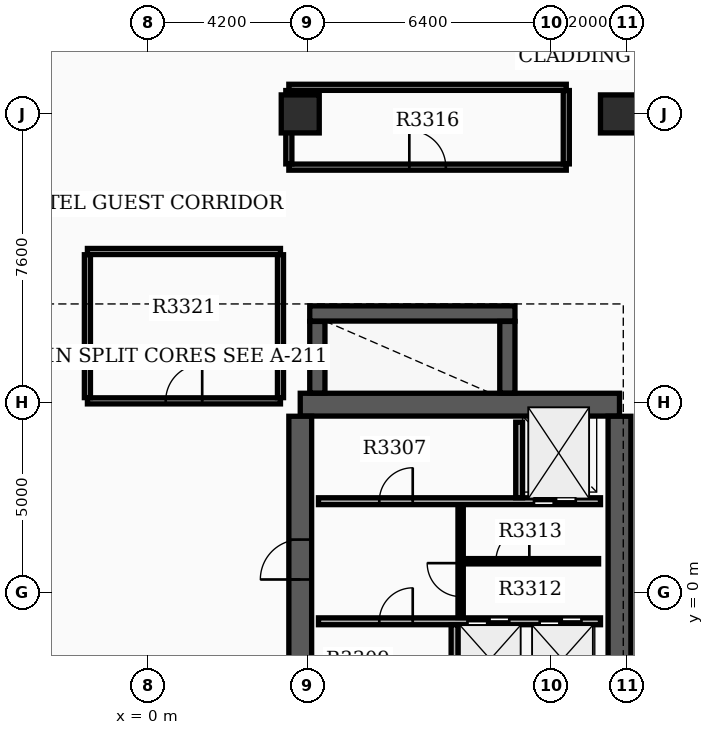
"""IFC4 building model, lengths in metres.
Left out: names, types, materials, properties, quantities, classifications, styles, units other than length and angle.
Written with IfcOpenShell. Run it as: python <this file> out.ifc"""

import sys

from ifc_helpers import new_model, si_unit, direction, frame, frame_2d, origin, origin_2d, place, context, subcontext, project, spatial, rectangle, extrude, element, fill, save


model = new_model("IFC4")
c1 = context("Model", 3, precision=1e-05, world=origin(), true_north=direction((0.0, 1.0)))
c2 = subcontext(c1, "Body", "Model", "MODEL_VIEW")
j1 = project(units=[si_unit("LENGTHUNIT", "METRE"), si_unit("PLANEANGLEUNIT", "RADIAN")], contexts=[c1])
p1 = place(None, origin())
s1 = spatial("IfcSite", under=j1, at=p1, CompositionType="ELEMENT")
p2 = place(p1, origin())
s2 = spatial("IfcBuilding", under=s1, at=p2, CompositionType="ELEMENT")
p3 = place(p2, frame((0.0, 0.0, 209.1)))
s3 = spatial("IfcBuildingStorey", under=s2, at=p3, CompositionType="ELEMENT", Elevation=209.1)
p4 = place(p3, frame((4.0, 4.95, 0.0), z_axis=(0.0, 0.0, 1.0), x_axis=(1.0, 0.0, 0.0)))
e1 = element("IfcWall", 1, at=p4, inside=s3, PredefinedType="SHEAR", context=c2, shape_type="SweptSolid", body=[
    extrude(rectangle(XDim=8.4, YDim=0.6, at=frame_2d((4.2, 0.0))), origin(), (0.0, 0.0, 1.0), 3.7),
])
p5 = place(p3, frame((4.0, -6.545, 0.0), z_axis=(0.0, 0.0, 1.0), x_axis=(0.0, 1.0, 0.0)))
e2 = element("IfcWall", 2, at=p5, inside=s3, PredefinedType="SHEAR", context=c2, shape_type="SweptSolid", body=[
    extrude(rectangle(XDim=11.19, YDim=0.6, at=frame_2d((5.595, 0.0))), origin(), (0.0, 0.0, 1.0), 3.7),
])
p6 = place(p5, frame((1.295, 0.0, 0.0)))
e3 = element("IfcOpeningElement", 3, at=p6, cuts=e2, PredefinedType="OPENING", context=c2, shape_type="SweptSolid", body=[
    extrude(rectangle(XDim=1.05, YDim=2.15, at=frame_2d((0.525, 1.075))), frame((0.0, 0.31, 0.0), z_axis=(0.0, -1.0, 0.0), x_axis=(1.0, 0.0, 0.0)), (0.0, 0.0, 1.0), 0.62),
])
p7 = place(p5, frame((6.895, 0.0, 0.0)))
e4 = element("IfcOpeningElement", 4, at=p7, cuts=e2, PredefinedType="OPENING", context=c2, shape_type="SweptSolid", body=[
    extrude(rectangle(XDim=1.05, YDim=2.15, at=frame_2d((0.525, 1.075))), frame((0.0, 0.31, 0.0), z_axis=(0.0, -1.0, 0.0), x_axis=(1.0, 0.0, 0.0)), (0.0, 0.0, 1.0), 0.62),
])
p8 = place(p3, frame((12.4, -6.545, 0.0), z_axis=(0.0, 0.0, 1.0), x_axis=(0.0, 1.0, 0.0)))
e5 = element("IfcWall", 5, at=p8, inside=s3, PredefinedType="SHEAR", context=c2, shape_type="SweptSolid", body=[
    extrude(rectangle(XDim=11.19, YDim=0.6, at=frame_2d((5.595, 0.0))), origin(), (0.0, 0.0, 1.0), 3.7),
])
p9 = place(p3, frame((4.45, 5.255, 0.0), z_axis=(0.0, 0.0, 1.0), x_axis=(0.0, 1.0, 0.0)))
e6 = element("IfcWall", 6, at=p9, inside=s3, PredefinedType="SHEAR", context=c2, shape_type="SweptSolid", body=[
    extrude(rectangle(XDim=1.885, YDim=0.4, at=frame_2d((0.942, 0.0))), origin(), (0.0, 0.0, 1.0), 3.7),
])
p10 = place(p3, frame((4.25, 7.35, 0.0), z_axis=(0.0, 0.0, 1.0), x_axis=(1.0, 0.0, 0.0)))
e7 = element("IfcWall", 7, at=p10, inside=s3, PredefinedType="SHEAR", context=c2, shape_type="SweptSolid", body=[
    extrude(rectangle(XDim=5.4, YDim=0.4, at=frame_2d((2.7, 0.0))), origin(), (0.0, 0.0, 1.0), 3.7),
])
p11 = place(p3, frame((9.45, 5.255, 0.0), z_axis=(0.0, 0.0, 1.0), x_axis=(0.0, 1.0, 0.0)))
e8 = element("IfcWall", 8, at=p11, inside=s3, PredefinedType="SHEAR", context=c2, shape_type="SweptSolid", body=[
    extrude(rectangle(XDim=1.885, YDim=0.4, at=frame_2d((0.942, 0.0))), origin(), (0.0, 0.0, 1.0), 3.7),
])
for number, where, z_axis, x_axis in (
    (9, (12.4, 12.6, 0.0), (0.0, 0.0, 1.0), (1.0, 0.0, 0.0)),
    (10, (4.0, 12.6, 0.0), (0.0, 0.0, 1.0), (1.0, 0.0, 0.0)),
):
    element("IfcColumn", number, at=place(p3, frame(where, z_axis=z_axis, x_axis=x_axis)), inside=s3, PredefinedType="COLUMN", context=c2, shape_type="SweptSolid", body=[
        extrude(rectangle(XDim=1.0, YDim=1.0, at=origin_2d()), origin(), (0.0, 0.0, 1.0), 3.9),
    ])
p12 = place(p3, frame((13.796, 14.194, 0.0), z_axis=(0.0, 0.0, 1.0), x_axis=(-0.998023660242, -0.06283926796, 0.0)))
e11 = element("IfcWall", 11, at=p12, inside=s3, PredefinedType="STANDARD", context=c2, shape_type="SweptSolid", body=[
    extrude(rectangle(XDim=1.22, YDim=0.28, at=frame_2d((0.61, 0.0))), origin(), (0.0, 0.0, 1.0), 3.18),
])
p13 = place(p3, frame((4.48, 2.41, 0.0), z_axis=(0.0, 0.0, 1.0), x_axis=(1.0, 0.0, 0.0)))
e12 = element("IfcWall", 12, at=p13, inside=s3, PredefinedType="SOLIDWALL", context=c2, shape_type="SweptSolid", body=[
    extrude(rectangle(XDim=7.42, YDim=0.18, at=frame_2d((3.71, 0.0))), origin(), (0.0, 0.0, 1.0), 3.17),
])
p14 = place(p13, frame((5.67, 0.0, 0.0)))
e13 = element("IfcOpeningElement", 13, at=p14, cuts=e12, PredefinedType="OPENING", context=c2, shape_type="SweptSolid", body=[
    extrude(rectangle(XDim=1.1, YDim=2.15, at=frame_2d((0.55, 1.075))), frame((0.0, 0.1, 0.0), z_axis=(0.0, -1.0, 0.0), x_axis=(1.0, 0.0, 0.0)), (0.0, 0.0, 1.0), 0.2),
])
p15 = place(p13, frame((1.6, 0.0, 0.0)))
e14 = element("IfcOpeningElement", 14, at=p15, cuts=e12, PredefinedType="OPENING", context=c2, shape_type="SweptSolid", body=[
    extrude(rectangle(XDim=0.88, YDim=2.1, at=frame_2d((0.44, 1.05))), frame((0.0, 0.1, 0.0), z_axis=(0.0, -1.0, 0.0), x_axis=(1.0, 0.0, 0.0)), (0.0, 0.0, 1.0), 0.2),
])
p16 = place(p3, frame((4.48, -0.75, 0.0), z_axis=(0.0, 0.0, 1.0), x_axis=(1.0, 0.0, 0.0)))
e15 = element("IfcWall", 15, at=p16, inside=s3, PredefinedType="SOLIDWALL", context=c2, shape_type="SweptSolid", body=[
    extrude(rectangle(XDim=7.42, YDim=0.18, at=frame_2d((3.71, 0.0))), origin(), (0.0, 0.0, 1.0), 3.17),
])
p17 = place(p16, frame((3.92, 0.0, 0.0)))
e16 = element("IfcOpeningElement", 16, at=p17, cuts=e15, PredefinedType="OPENING", context=c2, shape_type="SweptSolid", body=[
    extrude(rectangle(XDim=1.1, YDim=2.15, at=frame_2d((0.55, 1.075))), frame((0.0, 0.1, 0.0), z_axis=(0.0, -1.0, 0.0), x_axis=(1.0, 0.0, 0.0)), (0.0, 0.0, 1.0), 0.2),
])
p18 = place(p16, frame((5.82, 0.0, 0.0)))
e17 = element("IfcOpeningElement", 17, at=p18, cuts=e15, PredefinedType="OPENING", context=c2, shape_type="SweptSolid", body=[
    extrude(rectangle(XDim=1.1, YDim=2.15, at=frame_2d((0.55, 1.075))), frame((0.0, 0.1, 0.0), z_axis=(0.0, -1.0, 0.0), x_axis=(1.0, 0.0, 0.0)), (0.0, 0.0, 1.0), 0.2),
])
p19 = place(p16, frame((1.6, 0.0, 0.0)))
e18 = element("IfcOpeningElement", 18, at=p19, cuts=e15, PredefinedType="OPENING", context=c2, shape_type="SweptSolid", body=[
    extrude(rectangle(XDim=0.88, YDim=2.1, at=frame_2d((0.44, 1.05))), frame((0.0, 0.1, 0.0), z_axis=(0.0, -1.0, 0.0), x_axis=(1.0, 0.0, 0.0)), (0.0, 0.0, 1.0), 0.2),
])
p20 = place(p3, frame((9.76, 2.5, 0.0), z_axis=(0.0, 0.0, 1.0), x_axis=(0.0, 1.0, 0.0)))
e19 = element("IfcWall", 19, at=p20, inside=s3, PredefinedType="SOLIDWALL", context=c2, shape_type="SweptSolid", body=[
    extrude(rectangle(XDim=1.99, YDim=0.18, at=frame_2d((0.995, 0.0))), origin(), (0.0, 0.0, 1.0), 3.17),
])
p21 = place(p3, frame((8.06, -2.73, 0.0), z_axis=(0.0, 0.0, 1.0), x_axis=(0.0, 1.0, 0.0)))
e20 = element("IfcWall", 20, at=p21, inside=s3, PredefinedType="SOLIDWALL", context=c2, shape_type="SweptSolid", body=[
    extrude(rectangle(XDim=1.89, YDim=0.18, at=frame_2d((0.945, 0.0))), origin(), (0.0, 0.0, 1.0), 3.17),
])
p22 = place(p3, frame((8.22, -0.65, 0.0), z_axis=(0.0, 0.0, 1.0), x_axis=(0.0, 1.0, 0.0)))
e21 = element("IfcWall", 21, at=p22, inside=s3, PredefinedType="SOLIDWALL", context=c2, shape_type="SweptSolid", body=[
    extrude(rectangle(XDim=2.96, YDim=0.14, at=frame_2d((1.48, 0.0))), origin(), (0.0, 0.0, 1.0), 3.17),
])
p23 = place(p22, frame((0.55, 0.0, 0.0)))
e22 = element("IfcOpeningElement", 22, at=p23, cuts=e21, PredefinedType="OPENING", context=c2, shape_type="SweptSolid", body=[
    extrude(rectangle(XDim=0.88, YDim=2.1, at=frame_2d((0.44, 1.05))), frame((0.0, 0.08, 0.0), z_axis=(0.0, -1.0, 0.0), x_axis=(1.0, 0.0, 0.0)), (0.0, 0.0, 1.0), 0.16),
])
p24 = place(p3, frame((8.298, 0.83, 0.0), z_axis=(0.0, 0.0, 1.0), x_axis=(1.0, 0.0, 0.0)))
e23 = element("IfcWall", 23, at=p24, inside=s3, PredefinedType="PARTITIONING", context=c2, shape_type="SweptSolid", body=[
    extrude(rectangle(XDim=3.552, YDim=0.14, at=frame_2d((1.776, 0.0))), origin(), (0.0, 0.0, 1.0), 3.17),
])
p25 = place(p24, frame((0.85, 0.0, 0.0)))
e24 = element("IfcOpeningElement", 24, at=p25, cuts=e23, PredefinedType="OPENING", context=c2, shape_type="SweptSolid", body=[
    extrude(rectangle(XDim=0.88, YDim=2.1, at=frame_2d((0.44, 1.05))), frame((0.0, 0.08, 0.0), z_axis=(0.0, -1.0, 0.0), x_axis=(1.0, 0.0, 0.0)), (0.0, 0.0, 1.0), 0.16),
])
p26 = place(p3, frame((3.7, 11.2, 0.0), z_axis=(0.0, 0.0, 1.0), x_axis=(1.0, 0.0, 0.0)))
e25 = element("IfcWall", 25, at=p26, inside=s3, PredefinedType="PARTITIONING", context=c2, shape_type="SweptSolid", body=[
    extrude(rectangle(XDim=7.3, YDim=0.16, at=frame_2d((3.65, 0.0))), origin(), (0.0, 0.0, 1.0), 3.17),
])
p27 = place(p26, frame((3.17, 0.0, 0.0)))
e26 = element("IfcOpeningElement", 26, at=p27, cuts=e25, PredefinedType="OPENING", context=c2, shape_type="SweptSolid", body=[
    extrude(rectangle(XDim=0.96, YDim=2.15, at=frame_2d((0.48, 1.075))), frame((0.0, 0.09, 0.0), z_axis=(0.0, -1.0, 0.0), x_axis=(1.0, 0.0, 0.0)), (0.0, 0.0, 1.0), 0.18),
])
p28 = place(p3, frame((3.7, 13.3, 0.0), z_axis=(0.0, 0.0, 1.0), x_axis=(1.0, 0.0, 0.0)))
e27 = element("IfcWall", 27, at=p28, inside=s3, PredefinedType="PARTITIONING", context=c2, shape_type="SweptSolid", body=[
    extrude(rectangle(XDim=7.3, YDim=0.16, at=frame_2d((3.65, 0.0))), origin(), (0.0, 0.0, 1.0), 3.17),
])
for number, where, z_axis, x_axis in (
    (28, (3.7, 11.285, 0.0), (0.0, 0.0, 1.0), (0.0, 1.0, 0.0)),
    (29, (11.0, 11.285, 0.0), (0.0, 0.0, 1.0), (0.0, 1.0, 0.0)),
):
    element("IfcWall", number, at=place(p3, frame(where, z_axis=z_axis, x_axis=x_axis)), inside=s3, PredefinedType="PARTITIONING", context=c2, shape_type="SweptSolid", body=[
        extrude(rectangle(XDim=1.93, YDim=0.16, at=frame_2d((0.965, 0.0))), origin(), (0.0, 0.0, 1.0), 3.17),
    ])
p29 = place(p3, frame((-1.6, 5.05, 0.0), z_axis=(0.0, 0.0, 1.0), x_axis=(1.0, 0.0, 0.0)))
e30 = element("IfcWall", 30, at=p29, inside=s3, PredefinedType="PARTITIONING", context=c2, shape_type="SweptSolid", body=[
    extrude(rectangle(XDim=5.08, YDim=0.16, at=frame_2d((2.54, 0.0))), origin(), (0.0, 0.0, 1.0), 3.17),
])
p30 = place(p29, frame((2.06, 0.0, 0.0)))
e31 = element("IfcOpeningElement", 31, at=p30, cuts=e30, PredefinedType="OPENING", context=c2, shape_type="SweptSolid", body=[
    extrude(rectangle(XDim=0.96, YDim=2.15, at=frame_2d((0.48, 1.075))), frame((0.0, 0.09, 0.0), z_axis=(0.0, -1.0, 0.0), x_axis=(1.0, 0.0, 0.0)), (0.0, 0.0, 1.0), 0.18),
])
p31 = place(p3, frame((-1.6, 8.98, 0.0), z_axis=(0.0, 0.0, 1.0), x_axis=(1.0, 0.0, 0.0)))
e32 = element("IfcWall", 32, at=p31, inside=s3, PredefinedType="PARTITIONING", context=c2, shape_type="SweptSolid", body=[
    extrude(rectangle(XDim=5.08, YDim=0.16, at=frame_2d((2.54, 0.0))), origin(), (0.0, 0.0, 1.0), 3.17),
])
for number, where, z_axis, x_axis in (
    (33, (-1.6, 5.135, 0.0), (0.0, 0.0, 1.0), (0.0, 1.0, 0.0)),
    (34, (3.48, 5.135, 0.0), (0.0, 0.0, 1.0), (0.0, 1.0, 0.0)),
):
    element("IfcWall", number, at=place(p3, frame(where, z_axis=z_axis, x_axis=x_axis)), inside=s3, PredefinedType="PARTITIONING", context=c2, shape_type="SweptSolid", body=[
        extrude(rectangle(XDim=3.76, YDim=0.16, at=frame_2d((1.88, 0.0))), origin(), (0.0, 0.0, 1.0), 3.17),
    ])
p32 = place(p7, origin())
e35 = element("IfcDoor", 35, at=p32, inside=s3, OperationType="SINGLE_SWING_LEFT", PredefinedType="DOOR", context=c2, shape_type="SweptSolid", body=[
    extrude(rectangle(XDim=1.05, YDim=2.15, at=frame_2d((0.525, 1.075))), frame((0.0, 0.025, 0.0), z_axis=(0.0, -1.0, 0.0), x_axis=(1.0, 0.0, 0.0)), (0.0, 0.0, 1.0), 0.05),
])
fill(e4, e35)
p33 = place(p14, origin())
e36 = element("IfcDoor", 36, at=p33, inside=s3, OperationType="DOUBLE_DOOR_SLIDING", PredefinedType="DOOR", context=c2, shape_type="SweptSolid", body=[
    extrude(rectangle(XDim=1.1, YDim=2.15, at=frame_2d((0.55, 1.075))), frame((0.0, 0.025, 0.0), z_axis=(0.0, -1.0, 0.0), x_axis=(1.0, 0.0, 0.0)), (0.0, 0.0, 1.0), 0.05),
])
fill(e13, e36)
p34 = place(p17, origin())
e37 = element("IfcDoor", 37, at=p34, inside=s3, OperationType="DOUBLE_DOOR_SLIDING", PredefinedType="DOOR", context=c2, shape_type="SweptSolid", body=[
    extrude(rectangle(XDim=1.1, YDim=2.15, at=frame_2d((0.55, 1.075))), frame((0.0, 0.025, 0.0), z_axis=(0.0, -1.0, 0.0), x_axis=(1.0, 0.0, 0.0)), (0.0, 0.0, 1.0), 0.05),
])
fill(e16, e37)
p35 = place(p18, origin())
e38 = element("IfcDoor", 38, at=p35, inside=s3, OperationType="DOUBLE_DOOR_SLIDING", PredefinedType="DOOR", context=c2, shape_type="SweptSolid", body=[
    extrude(rectangle(XDim=1.1, YDim=2.15, at=frame_2d((0.55, 1.075))), frame((0.0, 0.025, 0.0), z_axis=(0.0, -1.0, 0.0), x_axis=(1.0, 0.0, 0.0)), (0.0, 0.0, 1.0), 0.05),
])
fill(e17, e38)
p36 = place(p15, origin())
e39 = element("IfcDoor", 39, at=p36, inside=s3, OperationType="SINGLE_SWING_RIGHT", PredefinedType="DOOR", context=c2, shape_type="SweptSolid", body=[
    extrude(rectangle(XDim=0.88, YDim=2.1, at=frame_2d((0.44, 1.05))), frame((0.0, 0.025, 0.0), z_axis=(0.0, -1.0, 0.0), x_axis=(1.0, 0.0, 0.0)), (0.0, 0.0, 1.0), 0.05),
])
fill(e14, e39)
p37 = place(p19, origin())
e40 = element("IfcDoor", 40, at=p37, inside=s3, OperationType="SINGLE_SWING_RIGHT", PredefinedType="DOOR", context=c2, shape_type="SweptSolid", body=[
    extrude(rectangle(XDim=0.88, YDim=2.1, at=frame_2d((0.44, 1.05))), frame((0.0, 0.025, 0.0), z_axis=(0.0, -1.0, 0.0), x_axis=(1.0, 0.0, 0.0)), (0.0, 0.0, 1.0), 0.05),
])
fill(e18, e40)
p38 = place(p23, origin())
e41 = element("IfcDoor", 41, at=p38, inside=s3, OperationType="SINGLE_SWING_RIGHT", PredefinedType="DOOR", context=c2, shape_type="SweptSolid", body=[
    extrude(rectangle(XDim=0.88, YDim=2.1, at=frame_2d((0.44, 1.05))), frame((0.0, 0.025, 0.0), z_axis=(0.0, -1.0, 0.0), x_axis=(1.0, 0.0, 0.0)), (0.0, 0.0, 1.0), 0.05),
])
fill(e22, e41)
p39 = place(p25, origin())
e42 = element("IfcDoor", 42, at=p39, inside=s3, OperationType="SINGLE_SWING_RIGHT", PredefinedType="DOOR", context=c2, shape_type="SweptSolid", body=[
    extrude(rectangle(XDim=0.88, YDim=2.1, at=frame_2d((0.44, 1.05))), frame((0.0, 0.025, 0.0), z_axis=(0.0, -1.0, 0.0), x_axis=(1.0, 0.0, 0.0)), (0.0, 0.0, 1.0), 0.05),
])
fill(e24, e42)
p40 = place(p27, origin())
e43 = element("IfcDoor", 43, at=p40, inside=s3, OperationType="SINGLE_SWING_LEFT", PredefinedType="DOOR", context=c2, shape_type="SweptSolid", body=[
    extrude(rectangle(XDim=0.96, YDim=2.15, at=frame_2d((0.48, 1.075))), frame((0.0, 0.025, 0.0), z_axis=(0.0, -1.0, 0.0), x_axis=(1.0, 0.0, 0.0)), (0.0, 0.0, 1.0), 0.05),
])
fill(e26, e43)
p41 = place(p30, origin())
e44 = element("IfcDoor", 44, at=p41, inside=s3, OperationType="SINGLE_SWING_RIGHT", PredefinedType="DOOR", context=c2, shape_type="SweptSolid", body=[
    extrude(rectangle(XDim=0.96, YDim=2.15, at=frame_2d((0.48, 1.075))), frame((0.0, 0.025, 0.0), z_axis=(0.0, -1.0, 0.0), x_axis=(1.0, 0.0, 0.0)), (0.0, 0.0, 1.0), 0.05),
])
fill(e31, e44)
save(model, sys.argv[1])
